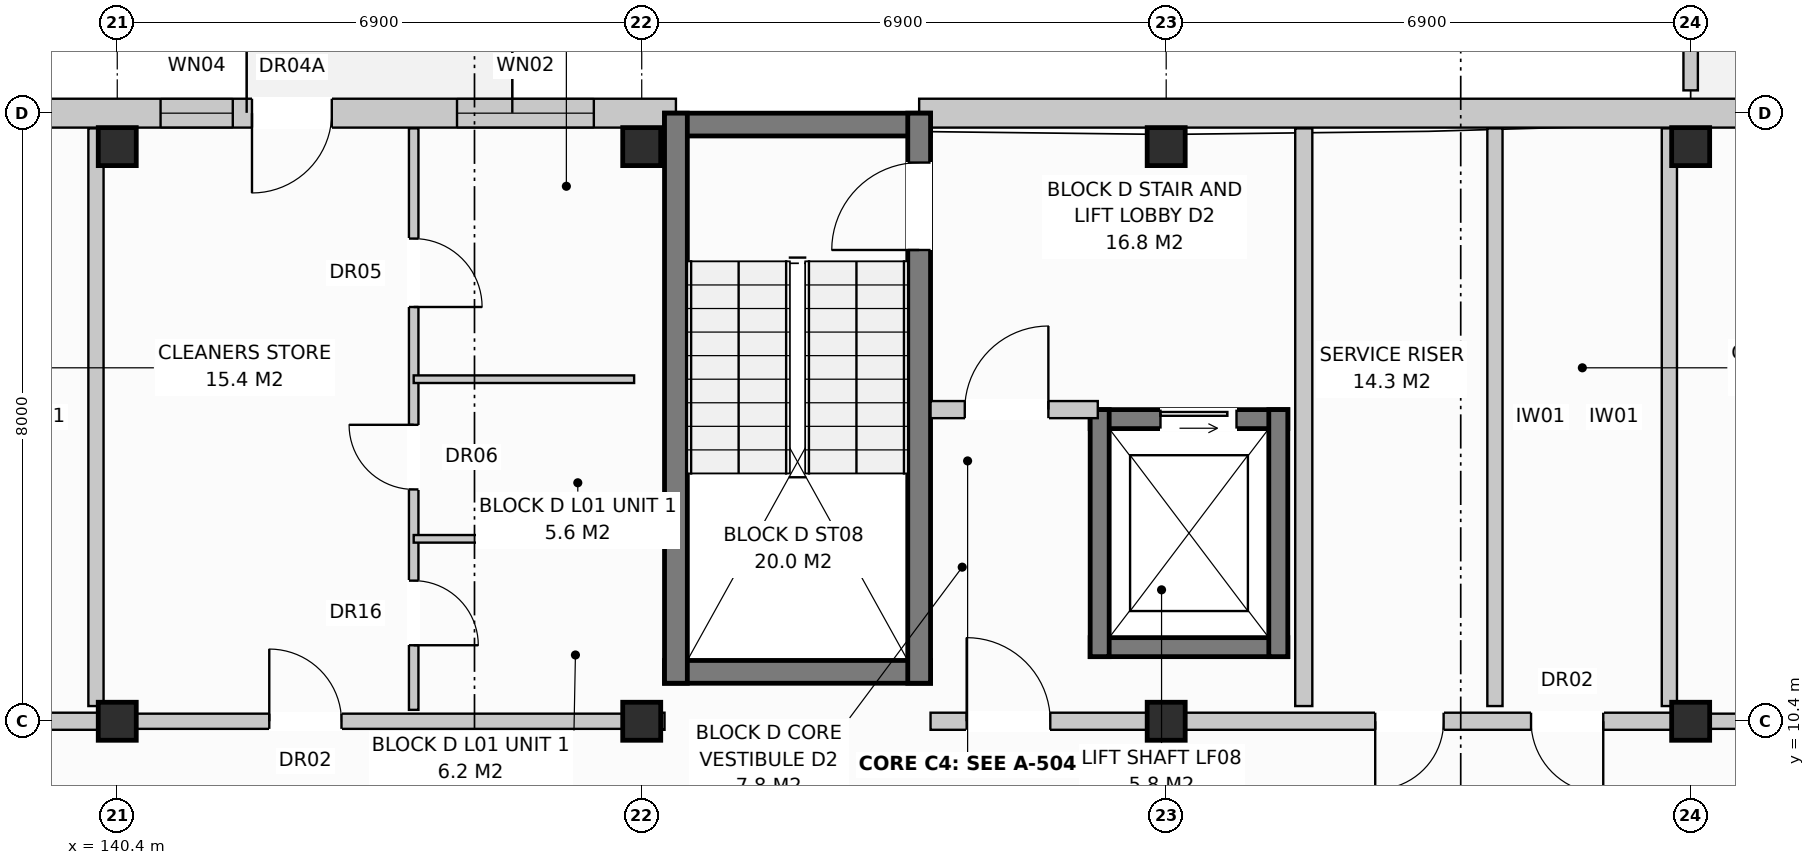
"""IFC4 building model, lengths in metres.
Left out: names, types, materials, properties, quantities, classifications, styles, units other than length and angle.
Written with IfcOpenShell. Run it as: python <this file> out.ifc"""

import sys

from ifc_helpers import new_model, si_unit, direction, frame, frame_2d, origin, origin_with_axes, origin_2d, place, context, subcontext, project, spatial, rectangle, extrude, element, fill, save


model = new_model("IFC4")
c1 = context("Model", 3, precision=1e-05, world=origin(), true_north=direction((0.0, 1.0)))
c2 = subcontext(c1, "Body", "Model", "MODEL_VIEW")
j1 = project(units=[si_unit("LENGTHUNIT", "METRE"), si_unit("PLANEANGLEUNIT", "RADIAN")], contexts=[c1])
p1 = place(None, origin())
s1 = spatial("IfcSite", under=j1, at=p1, CompositionType="ELEMENT")
p2 = place(p1, origin())
s2 = spatial("IfcBuilding", under=s1, at=p2, CompositionType="ELEMENT")
p3 = place(p2, frame((0.0, 0.0, 4.4)))
s3 = spatial("IfcBuildingStorey", under=s2, at=p3, CompositionType="ELEMENT", Elevation=4.4)
for number, where, z_axis, x_axis in (
    (1, (140.4, 10.4, 0.0), (0.0, 0.0, 1.0), (1.0, 0.0, 0.0)),
    (2, (140.4, 17.96, 0.0), (0.0, 0.0, 1.0), (1.0, 0.0, 0.0)),
    (3, (147.3, 10.4, 0.0), (0.0, 0.0, 1.0), (1.0, 0.0, 0.0)),
    (4, (147.3, 17.96, 0.0), (0.0, 0.0, 1.0), (1.0, 0.0, 0.0)),
    (5, (154.2, 10.4, 0.0), (0.0, 0.0, 1.0), (1.0, 0.0, 0.0)),
    (6, (154.2, 17.96, 0.0), (0.0, 0.0, 1.0), (1.0, 0.0, 0.0)),
    (7, (161.1, 10.4, 0.0), (0.0, 0.0, 1.0), (1.0, 0.0, 0.0)),
    (8, (161.1, 17.96, 0.0), (0.0, 0.0, 1.0), (1.0, 0.0, 0.0)),
):
    element("IfcColumn", number, at=place(p3, frame(where, z_axis=z_axis, x_axis=x_axis)), inside=s3, PredefinedType="COLUMN", context=c2, shape_type="SweptSolid", body=[
        extrude(rectangle(XDim=0.5, YDim=0.5, at=origin_2d()), origin(), (0.0, 0.0, 1.0), 3.6),
    ])
p4 = place(p3, frame((130.25, 18.4, 0.0), z_axis=(0.0, 0.0, 1.0), x_axis=(1.0, 0.0, 0.0)))
e9 = element("IfcWall", 9, at=p4, inside=s3, PredefinedType="STANDARD", context=c2, shape_type="SweptSolid", body=[
    extrude(rectangle(XDim=17.5, YDim=0.38, at=frame_2d((8.75, 0.0))), origin(), (0.0, 0.0, 1.0), 3.33),
])
p5 = place(p4, frame((11.923, 0.0, 0.0)))
e10 = element("IfcOpeningElement", 10, at=p5, cuts=e9, PredefinedType="OPENING", context=c2, shape_type="SweptSolid", body=[
    extrude(rectangle(XDim=1.05, YDim=2.12, at=frame_2d((0.525, 1.06))), frame((0.0, 0.202, 0.0), z_axis=(0.0, -1.0, 0.0), x_axis=(1.0, 0.0, 0.0)), (0.0, 0.0, 1.0), 0.404),
])
p6 = place(p4, frame((10.72, 0.0, 0.9)))
e11 = element("IfcOpeningElement", 11, at=p6, cuts=e9, PredefinedType="OPENING", context=c2, shape_type="SweptSolid", body=[
    extrude(rectangle(XDim=0.95, YDim=1.55, at=frame_2d((0.475, 0.775))), frame((0.0, 0.202, 0.0), z_axis=(0.0, -1.0, 0.0), x_axis=(1.0, 0.0, 0.0)), (0.0, 0.0, 1.0), 0.404),
])
p7 = place(p4, frame((14.62, 0.0, 0.8)))
e12 = element("IfcOpeningElement", 12, at=p7, cuts=e9, PredefinedType="OPENING", context=c2, shape_type="SweptSolid", body=[
    extrude(rectangle(XDim=1.8, YDim=1.7, at=frame_2d((0.9, 0.85))), frame((0.0, 0.202, 0.0), z_axis=(0.0, -1.0, 0.0), x_axis=(1.0, 0.0, 0.0)), (0.0, 0.0, 1.0), 0.404),
])
p8 = place(p3, frame((150.95, 18.4, 0.0), z_axis=(0.0, 0.0, 1.0), x_axis=(1.0, 0.0, 0.0)))
e13 = element("IfcWall", 13, at=p8, inside=s3, PredefinedType="STANDARD", context=c2, shape_type="SweptSolid", body=[
    extrude(rectangle(XDim=16.87, YDim=0.38, at=frame_2d((8.435, 0.0))), origin(), (0.0, 0.0, 1.0), 3.33),
])
p9 = place(p8, frame((11.17, 0.0, 0.8)))
e14 = element("IfcOpeningElement", 14, at=p9, cuts=e13, PredefinedType="OPENING", context=c2, shape_type="SweptSolid", body=[
    extrude(rectangle(XDim=1.9, YDim=1.85, at=frame_2d((0.95, 0.925))), frame((0.0, 0.202, 0.0), z_axis=(0.0, -1.0, 0.0), x_axis=(1.0, 0.0, 0.0)), (0.0, 0.0, 1.0), 0.404),
])
p10 = place(p8, frame((14.285, 0.0, 0.8)))
e15 = element("IfcOpeningElement", 15, at=p10, cuts=e13, PredefinedType="OPENING", context=c2, shape_type="SweptSolid", body=[
    extrude(rectangle(XDim=1.95, YDim=1.65, at=frame_2d((0.975, 0.825))), frame((0.0, 0.202, 0.0), z_axis=(0.0, -1.0, 0.0), x_axis=(1.0, 0.0, 0.0)), (0.0, 0.0, 1.0), 0.404),
])
p11 = place(p3, frame((161.1, 25.8, 0.0), z_axis=(0.0, 0.0, 1.0), x_axis=(0.0, -1.0, 0.0)))
e16 = element("IfcWall", 16, at=p11, inside=s3, PredefinedType="PARAPET", context=c2, shape_type="SweptSolid", body=[
    extrude(rectangle(XDim=7.1, YDim=0.19, at=frame_2d((3.55, 0.0))), origin(), (0.0, 0.0, 1.0), 1.1),
])
p12 = place(p3, frame((140.12, 10.6, 0.0), z_axis=(0.0, 0.0, 1.0), x_axis=(0.0, 1.0, 0.0)))
e17 = element("IfcWall", 17, at=p12, inside=s3, PredefinedType="PARTITIONING", context=c2, shape_type="SweptSolid", body=[
    extrude(rectangle(XDim=7.6, YDim=0.2, at=frame_2d((3.8, 0.0))), origin(), (0.0, 0.0, 1.0), 3.33),
])
p13 = place(p3, frame((130.4, 10.4, 0.0), z_axis=(0.0, 0.0, 1.0), x_axis=(1.0, 0.0, 0.0)))
e18 = element("IfcWall", 18, at=p13, inside=s3, PredefinedType="PARTITIONING", context=c2, shape_type="SweptSolid", body=[
    extrude(rectangle(XDim=10.0, YDim=0.225, at=frame_2d((5.0, 0.0))), origin(), (0.0, 0.0, 1.0), 2.77),
])
p14 = place(p13, frame((0.475, 0.0, 0.0)))
e19 = element("IfcOpeningElement", 19, at=p14, cuts=e18, PredefinedType="OPENING", context=c2, shape_type="SweptSolid", body=[
    extrude(rectangle(XDim=1.1, YDim=2.15, at=frame_2d((0.55, 1.075))), frame((0.0, 0.125, 0.0), z_axis=(0.0, -1.0, 0.0), x_axis=(1.0, 0.0, 0.0)), (0.0, 0.0, 1.0), 0.249),
])
p15 = place(p13, frame((5.85, 0.0, 0.0)))
e20 = element("IfcOpeningElement", 20, at=p15, cuts=e18, PredefinedType="OPENING", context=c2, shape_type="SweptSolid", body=[
    extrude(rectangle(XDim=0.9, YDim=2.1, at=frame_2d((0.45, 1.05))), frame((0.0, 0.125, 0.0), z_axis=(0.0, -1.0, 0.0), x_axis=(1.0, 0.0, 0.0)), (0.0, 0.0, 1.0), 0.249),
])
p16 = place(p13, frame((7.9, 0.0, 0.0)))
e21 = element("IfcOpeningElement", 21, at=p16, cuts=e18, PredefinedType="OPENING", context=c2, shape_type="SweptSolid", body=[
    extrude(rectangle(XDim=0.95, YDim=2.15, at=frame_2d((0.475, 1.075))), frame((0.0, 0.125, 0.0), z_axis=(0.0, -1.0, 0.0), x_axis=(1.0, 0.0, 0.0)), (0.0, 0.0, 1.0), 0.249),
])
for number, where, z_axis, x_axis in (
    (22, (147.6, 18.25, 0.0), (0.0, 0.0, 1.0), (1.0, 0.0, 0.0)),
    (23, (147.6, 11.05, 0.0), (0.0, 0.0, 1.0), (1.0, 0.0, 0.0)),
):
    element("IfcWall", number, at=place(p3, frame(where, z_axis=z_axis, x_axis=x_axis)), inside=s3, PredefinedType="SHEAR", context=c2, shape_type="SweptSolid", body=[
        extrude(rectangle(XDim=3.5, YDim=0.3, at=frame_2d((1.75, 0.0))), origin(), (0.0, 0.0, 1.0), 3.33),
    ])
p17 = place(p3, frame((147.75, 10.9, 0.0), z_axis=(0.0, 0.0, 1.0), x_axis=(0.0, 1.0, 0.0)))
e24 = element("IfcWall", 24, at=p17, inside=s3, PredefinedType="SHEAR", context=c2, shape_type="SweptSolid", body=[
    extrude(rectangle(XDim=7.5, YDim=0.3, at=frame_2d((3.75, 0.0))), origin(), (0.0, 0.0, 1.0), 3.33),
])
p18 = place(p3, frame((150.95, 10.9, 0.0), z_axis=(0.0, 0.0, 1.0), x_axis=(0.0, 1.0, 0.0)))
e25 = element("IfcWall", 25, at=p18, inside=s3, PredefinedType="SHEAR", context=c2, shape_type="SweptSolid", body=[
    extrude(rectangle(XDim=7.5, YDim=0.3, at=frame_2d((3.75, 0.0))), origin(), (0.0, 0.0, 1.0), 3.33),
])
p19 = place(p18, frame((5.7, 0.0, 0.0)))
e26 = element("IfcOpeningElement", 26, at=p19, cuts=e25, PredefinedType="OPENING", context=c2, shape_type="SweptSolid", body=[
    extrude(rectangle(XDim=1.15, YDim=2.15, at=frame_2d((0.575, 1.075))), frame((0.0, 0.162, 0.0), z_axis=(0.0, -1.0, 0.0), x_axis=(1.0, 0.0, 0.0)), (0.0, 0.0, 1.0), 0.324),
])
p20 = place(p3, frame((153.2, 14.375, 0.0), z_axis=(0.0, 0.0, 1.0), x_axis=(1.0, 0.0, 0.0)))
e27 = element("IfcWall", 27, at=p20, inside=s3, PredefinedType="SHEAR", context=c2, shape_type="SweptSolid", body=[
    extrude(rectangle(XDim=2.6, YDim=0.25, at=frame_2d((1.3, 0.0))), origin(), (0.0, 0.0, 1.0), 3.33),
])
p21 = place(p20, frame((0.925, 0.0, 0.0)))
e28 = element("IfcOpeningElement", 28, at=p21, cuts=e27, PredefinedType="OPENING", context=c2, shape_type="SweptSolid", body=[
    extrude(rectangle(XDim=1.0, YDim=2.1, at=frame_2d((0.5, 1.05))), frame((0.0, 0.137, 0.0), z_axis=(0.0, -1.0, 0.0), x_axis=(1.0, 0.0, 0.0)), (0.0, 0.0, 1.0), 0.274),
])
p22 = place(p3, frame((153.2, 11.375, 0.0), z_axis=(0.0, 0.0, 1.0), x_axis=(1.0, 0.0, 0.0)))
e29 = element("IfcWall", 29, at=p22, inside=s3, PredefinedType="SHEAR", context=c2, shape_type="SweptSolid", body=[
    extrude(rectangle(XDim=2.6, YDim=0.25, at=frame_2d((1.3, 0.0))), origin(), (0.0, 0.0, 1.0), 3.33),
])
for number, where, z_axis, x_axis in (
    (30, (153.325, 11.25, 0.0), (0.0, 0.0, 1.0), (0.0, 1.0, 0.0)),
    (31, (155.675, 11.25, 0.0), (0.0, 0.0, 1.0), (0.0, 1.0, 0.0)),
):
    element("IfcWall", number, at=place(p3, frame(where, z_axis=z_axis, x_axis=x_axis)), inside=s3, PredefinedType="SHEAR", context=c2, shape_type="SweptSolid", body=[
        extrude(rectangle(XDim=3.25, YDim=0.25, at=frame_2d((1.625, 0.0))), origin(), (0.0, 0.0, 1.0), 3.33),
    ])
p23 = place(p3, frame((156.01, 10.6, 0.0), z_axis=(0.0, 0.0, 1.0), x_axis=(0.0, 1.0, 0.0)))
e32 = element("IfcWall", 32, at=p23, inside=s3, PredefinedType="PARTITIONING", context=c2, shape_type="SweptSolid", body=[
    extrude(rectangle(XDim=7.6, YDim=0.225, at=frame_2d((3.8, 0.0))), origin(), (0.0, 0.0, 1.0), 2.99),
])
p24 = place(p3, frame((151.1, 14.5, 0.0), z_axis=(0.0, 0.0, 1.0), x_axis=(1.0, 0.0, 0.0)))
e33 = element("IfcWall", 33, at=p24, inside=s3, PredefinedType="PARTITIONING", context=c2, shape_type="SweptSolid", body=[
    extrude(rectangle(XDim=2.2, YDim=0.225, at=frame_2d((1.1, 0.0))), origin(), (0.0, 0.0, 1.0), 3.33),
])
p25 = place(p24, frame((0.45, 0.0, 0.0)))
e34 = element("IfcOpeningElement", 34, at=p25, cuts=e33, PredefinedType="OPENING", context=c2, shape_type="SweptSolid", body=[
    extrude(rectangle(XDim=1.1, YDim=2.15, at=frame_2d((0.55, 1.075))), frame((0.0, 0.125, 0.0), z_axis=(0.0, -1.0, 0.0), x_axis=(1.0, 0.0, 0.0)), (0.0, 0.0, 1.0), 0.249),
])
p26 = place(p3, frame((147.3, 10.4, 0.0), z_axis=(0.0, 0.0, 1.0), x_axis=(1.0, 0.0, 0.0)))
e35 = element("IfcWall", 35, at=p26, inside=s3, PredefinedType="PARTITIONING", context=c2, shape_type="SweptSolid", body=[
    extrude(rectangle(XDim=0.3, YDim=0.225, at=frame_2d((0.15, 0.0))), origin(), (0.0, 0.0, 1.0), 3.33),
])
p27 = place(p3, frame((158.525, 10.6, 0.0), z_axis=(0.0, 0.0, 1.0), x_axis=(0.0, 1.0, 0.0)))
e36 = element("IfcWall", 36, at=p27, inside=s3, PredefinedType="PARTITIONING", context=c2, shape_type="SweptSolid", body=[
    extrude(rectangle(XDim=7.6, YDim=0.2, at=frame_2d((3.8, 0.0))), origin(), (0.0, 0.0, 1.0), 3.33),
])
p28 = place(p3, frame((160.82, 10.6, 0.0), z_axis=(0.0, 0.0, 1.0), x_axis=(0.0, 1.0, 0.0)))
e37 = element("IfcWall", 37, at=p28, inside=s3, PredefinedType="PARTITIONING", context=c2, shape_type="SweptSolid", body=[
    extrude(rectangle(XDim=7.6, YDim=0.2, at=frame_2d((3.8, 0.0))), origin(), (0.0, 0.0, 1.0), 2.77),
])
p29 = place(p3, frame((151.1, 10.4, 0.0), z_axis=(0.0, 0.0, 1.0), x_axis=(1.0, 0.0, 0.0)))
e38 = element("IfcWall", 38, at=p29, inside=s3, PredefinedType="PARTITIONING", context=c2, shape_type="SweptSolid", body=[
    extrude(rectangle(XDim=10.0, YDim=0.225, at=frame_2d((5.0, 0.0))), origin(), (0.0, 0.0, 1.0), 2.77),
])
p30 = place(p29, frame((0.475, 0.0, 0.0)))
e39 = element("IfcOpeningElement", 39, at=p30, cuts=e38, PredefinedType="OPENING", context=c2, shape_type="SweptSolid", body=[
    extrude(rectangle(XDim=1.1, YDim=2.15, at=frame_2d((0.55, 1.075))), frame((0.0, 0.125, 0.0), z_axis=(0.0, -1.0, 0.0), x_axis=(1.0, 0.0, 0.0)), (0.0, 0.0, 1.0), 0.249),
])
p31 = place(p29, frame((5.85, 0.0, 0.0)))
e40 = element("IfcOpeningElement", 40, at=p31, cuts=e38, PredefinedType="OPENING", context=c2, shape_type="SweptSolid", body=[
    extrude(rectangle(XDim=0.9, YDim=2.1, at=frame_2d((0.45, 1.05))), frame((0.0, 0.125, 0.0), z_axis=(0.0, -1.0, 0.0), x_axis=(1.0, 0.0, 0.0)), (0.0, 0.0, 1.0), 0.249),
])
p32 = place(p29, frame((7.9, 0.0, 0.0)))
e41 = element("IfcOpeningElement", 41, at=p32, cuts=e38, PredefinedType="OPENING", context=c2, shape_type="SweptSolid", body=[
    extrude(rectangle(XDim=0.95, YDim=2.15, at=frame_2d((0.475, 1.075))), frame((0.0, 0.125, 0.0), z_axis=(0.0, -1.0, 0.0), x_axis=(1.0, 0.0, 0.0)), (0.0, 0.0, 1.0), 0.249),
])
p33 = place(p3, frame((140.4, 10.4, 0.0), z_axis=(0.0, 0.0, 1.0), x_axis=(1.0, 0.0, 0.0)))
e42 = element("IfcWall", 42, at=p33, inside=s3, PredefinedType="PARTITIONING", context=c2, shape_type="SweptSolid", body=[
    extrude(rectangle(XDim=6.9, YDim=0.2, at=frame_2d((3.45, 0.0))), origin(), (0.0, 0.0, 1.0), 2.77),
])
p34 = place(p33, frame((2.0, 0.0, 0.0)))
e43 = element("IfcOpeningElement", 43, at=p34, cuts=e42, PredefinedType="OPENING", context=c2, shape_type="SweptSolid", body=[
    extrude(rectangle(XDim=0.95, YDim=2.15, at=frame_2d((0.475, 1.075))), frame((0.0, 0.112, 0.0), z_axis=(0.0, -1.0, 0.0), x_axis=(1.0, 0.0, 0.0)), (0.0, 0.0, 1.0), 0.224),
])
p35 = place(p3, frame((144.3, 10.55, 0.0), z_axis=(0.0, 0.0, 1.0), x_axis=(0.0, 1.0, 0.0)))
e44 = element("IfcWall", 44, at=p35, inside=s3, PredefinedType="PARTITIONING", context=c2, shape_type="SweptSolid", body=[
    extrude(rectangle(XDim=7.65, YDim=0.125, at=frame_2d((3.825, 0.0))), origin(), (0.0, 0.0, 1.0), 3.33),
])
p36 = place(p35, frame((0.85, 0.0, 0.0)))
e45 = element("IfcOpeningElement", 45, at=p36, cuts=e44, PredefinedType="OPENING", context=c2, shape_type="SweptSolid", body=[
    extrude(rectangle(XDim=0.85, YDim=2.1, at=frame_2d((0.425, 1.05))), frame((0.0, 0.074, 0.0), z_axis=(0.0, -1.0, 0.0), x_axis=(1.0, 0.0, 0.0)), (0.0, 0.0, 1.0), 0.149),
])
p37 = place(p35, frame((2.9, 0.0, 0.0)))
e46 = element("IfcOpeningElement", 46, at=p37, cuts=e44, PredefinedType="OPENING", context=c2, shape_type="SweptSolid", body=[
    extrude(rectangle(XDim=0.85, YDim=2.05, at=frame_2d((0.425, 1.025))), frame((0.0, 0.074, 0.0), z_axis=(0.0, -1.0, 0.0), x_axis=(1.0, 0.0, 0.0)), (0.0, 0.0, 1.0), 0.149),
])
p38 = place(p35, frame((5.3, 0.0, 0.0)))
e47 = element("IfcOpeningElement", 47, at=p38, cuts=e44, PredefinedType="OPENING", context=c2, shape_type="SweptSolid", body=[
    extrude(rectangle(XDim=0.9, YDim=2.1, at=frame_2d((0.45, 1.05))), frame((0.0, 0.074, 0.0), z_axis=(0.0, -1.0, 0.0), x_axis=(1.0, 0.0, 0.0)), (0.0, 0.0, 1.0), 0.149),
])
for number, where, z_axis, x_axis in (
    (48, (144.3, 12.8, 0.0), (0.0, 0.0, 1.0), (1.0, 0.0, 0.0)),
    (49, (144.3, 14.9, 0.0), (0.0, 0.0, 1.0), (1.0, 0.0, 0.0)),
):
    element("IfcWall", number, at=place(p3, frame(where, z_axis=z_axis, x_axis=x_axis)), inside=s3, PredefinedType="PARTITIONING", context=c2, shape_type="SweptSolid", body=[
        extrude(rectangle(XDim=2.9, YDim=0.1, at=frame_2d((1.45, 0.0))), origin(), (0.0, 0.0, 1.0), 3.33),
    ])
p39 = place(p3, frame((161.1, 10.4, 0.0), z_axis=(0.0, 0.0, 1.0), x_axis=(1.0, 0.0, 0.0)))
e50 = element("IfcWall", 50, at=p39, inside=s3, PredefinedType="PARTITIONING", context=c2, shape_type="SweptSolid", body=[
    extrude(rectangle(XDim=6.9, YDim=0.2, at=frame_2d((3.45, 0.0))), origin(), (0.0, 0.0, 1.0), 2.77),
])
p40 = place(p39, frame((2.0, 0.0, 0.0)))
e51 = element("IfcOpeningElement", 51, at=p40, cuts=e50, PredefinedType="OPENING", context=c2, shape_type="SweptSolid", body=[
    extrude(rectangle(XDim=0.95, YDim=2.15, at=frame_2d((0.475, 1.075))), frame((0.0, 0.112, 0.0), z_axis=(0.0, -1.0, 0.0), x_axis=(1.0, 0.0, 0.0)), (0.0, 0.0, 1.0), 0.224),
])
p41 = place(p5, frame((1.05, 0.0, 0.0), z_axis=(0.0, 0.0, 1.0), x_axis=(-1.0, 0.0, 0.0)))
e52 = element("IfcDoor", 52, at=p41, inside=s3, OperationType="SINGLE_SWING_LEFT", PredefinedType="DOOR", context=c2, shape_type="SweptSolid", body=[
    extrude(rectangle(XDim=1.05, YDim=2.12, at=frame_2d((0.525, 1.06))), frame((0.0, 0.025, 0.0), z_axis=(0.0, -1.0, 0.0), x_axis=(1.0, 0.0, 0.0)), (0.0, 0.0, 1.0), 0.05),
])
fill(e10, e52)
p42 = place(p6, origin_with_axes())
e53 = element("IfcWindow", 53, at=p42, inside=s3, PartitioningType="SINGLE_PANEL", PredefinedType="WINDOW", context=c2, shape_type="SweptSolid", body=[
    extrude(rectangle(XDim=0.95, YDim=1.55, at=frame_2d((0.475, 0.775))), frame((0.0, 0.03, 0.0), z_axis=(0.0, -1.0, 0.0), x_axis=(1.0, 0.0, 0.0)), (0.0, 0.0, 1.0), 0.06),
])
fill(e11, e53)
p43 = place(p7, origin_with_axes())
e54 = element("IfcWindow", 54, at=p43, inside=s3, PartitioningType="SINGLE_PANEL", PredefinedType="WINDOW", context=c2, shape_type="SweptSolid", body=[
    extrude(rectangle(XDim=1.8, YDim=1.7, at=frame_2d((0.9, 0.85))), frame((0.0, 0.03, 0.0), z_axis=(0.0, -1.0, 0.0), x_axis=(1.0, 0.0, 0.0)), (0.0, 0.0, 1.0), 0.06),
])
fill(e12, e54)
p44 = place(p19, origin_with_axes())
e55 = element("IfcDoor", 55, at=p44, inside=s3, OperationType="SINGLE_SWING_LEFT", PredefinedType="DOOR", context=c2, shape_type="SweptSolid", body=[
    extrude(rectangle(XDim=1.15, YDim=2.15, at=frame_2d((0.575, 1.075))), frame((0.0, 0.025, 0.0), z_axis=(0.0, -1.0, 0.0), x_axis=(1.0, 0.0, 0.0)), (0.0, 0.0, 1.0), 0.05),
])
fill(e26, e55)
p45 = place(p21, origin_with_axes())
e56 = element("IfcDoor", 56, at=p45, inside=s3, OperationType="SLIDING_TO_LEFT", PredefinedType="DOOR", context=c2, shape_type="SweptSolid", body=[
    extrude(rectangle(XDim=1.0, YDim=2.1, at=frame_2d((0.5, 1.05))), frame((0.0, 0.025, 0.0), z_axis=(0.0, -1.0, 0.0), x_axis=(1.0, 0.0, 0.0)), (0.0, 0.0, 1.0), 0.05),
])
fill(e28, e56)
p46 = place(p25, origin_with_axes())
e57 = element("IfcDoor", 57, at=p46, inside=s3, OperationType="SINGLE_SWING_RIGHT", PredefinedType="DOOR", context=c2, shape_type="SweptSolid", body=[
    extrude(rectangle(XDim=1.1, YDim=2.15, at=frame_2d((0.55, 1.075))), frame((0.0, 0.025, 0.0), z_axis=(0.0, -1.0, 0.0), x_axis=(1.0, 0.0, 0.0)), (0.0, 0.0, 1.0), 0.05),
])
fill(e34, e57)
p47 = place(p30, origin_with_axes())
e58 = element("IfcDoor", 58, at=p47, inside=s3, OperationType="SINGLE_SWING_LEFT", PredefinedType="DOOR", context=c2, shape_type="SweptSolid", body=[
    extrude(rectangle(XDim=1.1, YDim=2.15, at=frame_2d((0.55, 1.075))), frame((0.0, 0.025, 0.0), z_axis=(0.0, -1.0, 0.0), x_axis=(1.0, 0.0, 0.0)), (0.0, 0.0, 1.0), 0.05),
])
fill(e39, e58)
p48 = place(p31, frame((0.9, 0.0, 0.0), z_axis=(0.0, 0.0, 1.0), x_axis=(-1.0, 0.0, 0.0)))
e59 = element("IfcDoor", 59, at=p48, inside=s3, OperationType="SINGLE_SWING_LEFT", PredefinedType="DOOR", context=c2, shape_type="SweptSolid", body=[
    extrude(rectangle(XDim=0.9, YDim=2.1, at=frame_2d((0.45, 1.05))), frame((0.0, 0.025, 0.0), z_axis=(0.0, -1.0, 0.0), x_axis=(1.0, 0.0, 0.0)), (0.0, 0.0, 1.0), 0.05),
])
fill(e40, e59)
p49 = place(p32, frame((0.95, 0.0, 0.0), z_axis=(0.0, 0.0, 1.0), x_axis=(-1.0, 0.0, 0.0)))
e60 = element("IfcDoor", 60, at=p49, inside=s3, OperationType="SINGLE_SWING_RIGHT", PredefinedType="DOOR", context=c2, shape_type="SweptSolid", body=[
    extrude(rectangle(XDim=0.95, YDim=2.15, at=frame_2d((0.475, 1.075))), frame((0.0, 0.025, 0.0), z_axis=(0.0, -1.0, 0.0), x_axis=(1.0, 0.0, 0.0)), (0.0, 0.0, 1.0), 0.05),
])
fill(e41, e60)
p50 = place(p34, origin_with_axes())
e61 = element("IfcDoor", 61, at=p50, inside=s3, OperationType="SINGLE_SWING_LEFT", PredefinedType="DOOR", context=c2, shape_type="SweptSolid", body=[
    extrude(rectangle(XDim=0.95, YDim=2.15, at=frame_2d((0.475, 1.075))), frame((0.0, 0.025, 0.0), z_axis=(0.0, -1.0, 0.0), x_axis=(1.0, 0.0, 0.0)), (0.0, 0.0, 1.0), 0.05),
])
fill(e43, e61)
p51 = place(p36, frame((0.85, 0.0, 0.0), z_axis=(0.0, 0.0, 1.0), x_axis=(-1.0, 0.0, 0.0)))
e62 = element("IfcDoor", 62, at=p51, inside=s3, OperationType="SINGLE_SWING_LEFT", PredefinedType="DOOR", context=c2, shape_type="SweptSolid", body=[
    extrude(rectangle(XDim=0.85, YDim=2.1, at=frame_2d((0.425, 1.05))), frame((0.0, 0.025, 0.0), z_axis=(0.0, -1.0, 0.0), x_axis=(1.0, 0.0, 0.0)), (0.0, 0.0, 1.0), 0.05),
])
fill(e45, e62)
p52 = place(p37, origin_with_axes())
e63 = element("IfcDoor", 63, at=p52, inside=s3, OperationType="SINGLE_SWING_RIGHT", PredefinedType="DOOR", context=c2, shape_type="SweptSolid", body=[
    extrude(rectangle(XDim=0.85, YDim=2.05, at=frame_2d((0.425, 1.025))), frame((0.0, 0.025, 0.0), z_axis=(0.0, -1.0, 0.0), x_axis=(1.0, 0.0, 0.0)), (0.0, 0.0, 1.0), 0.05),
])
fill(e46, e63)
p53 = place(p38, frame((0.9, 0.0, 0.0), z_axis=(0.0, 0.0, 1.0), x_axis=(-1.0, 0.0, 0.0)))
e64 = element("IfcDoor", 64, at=p53, inside=s3, OperationType="SINGLE_SWING_LEFT", PredefinedType="DOOR", context=c2, shape_type="SweptSolid", body=[
    extrude(rectangle(XDim=0.9, YDim=2.1, at=frame_2d((0.45, 1.05))), frame((0.0, 0.025, 0.0), z_axis=(0.0, -1.0, 0.0), x_axis=(1.0, 0.0, 0.0)), (0.0, 0.0, 1.0), 0.05),
])
fill(e47, e64)
save(model, sys.argv[1])
